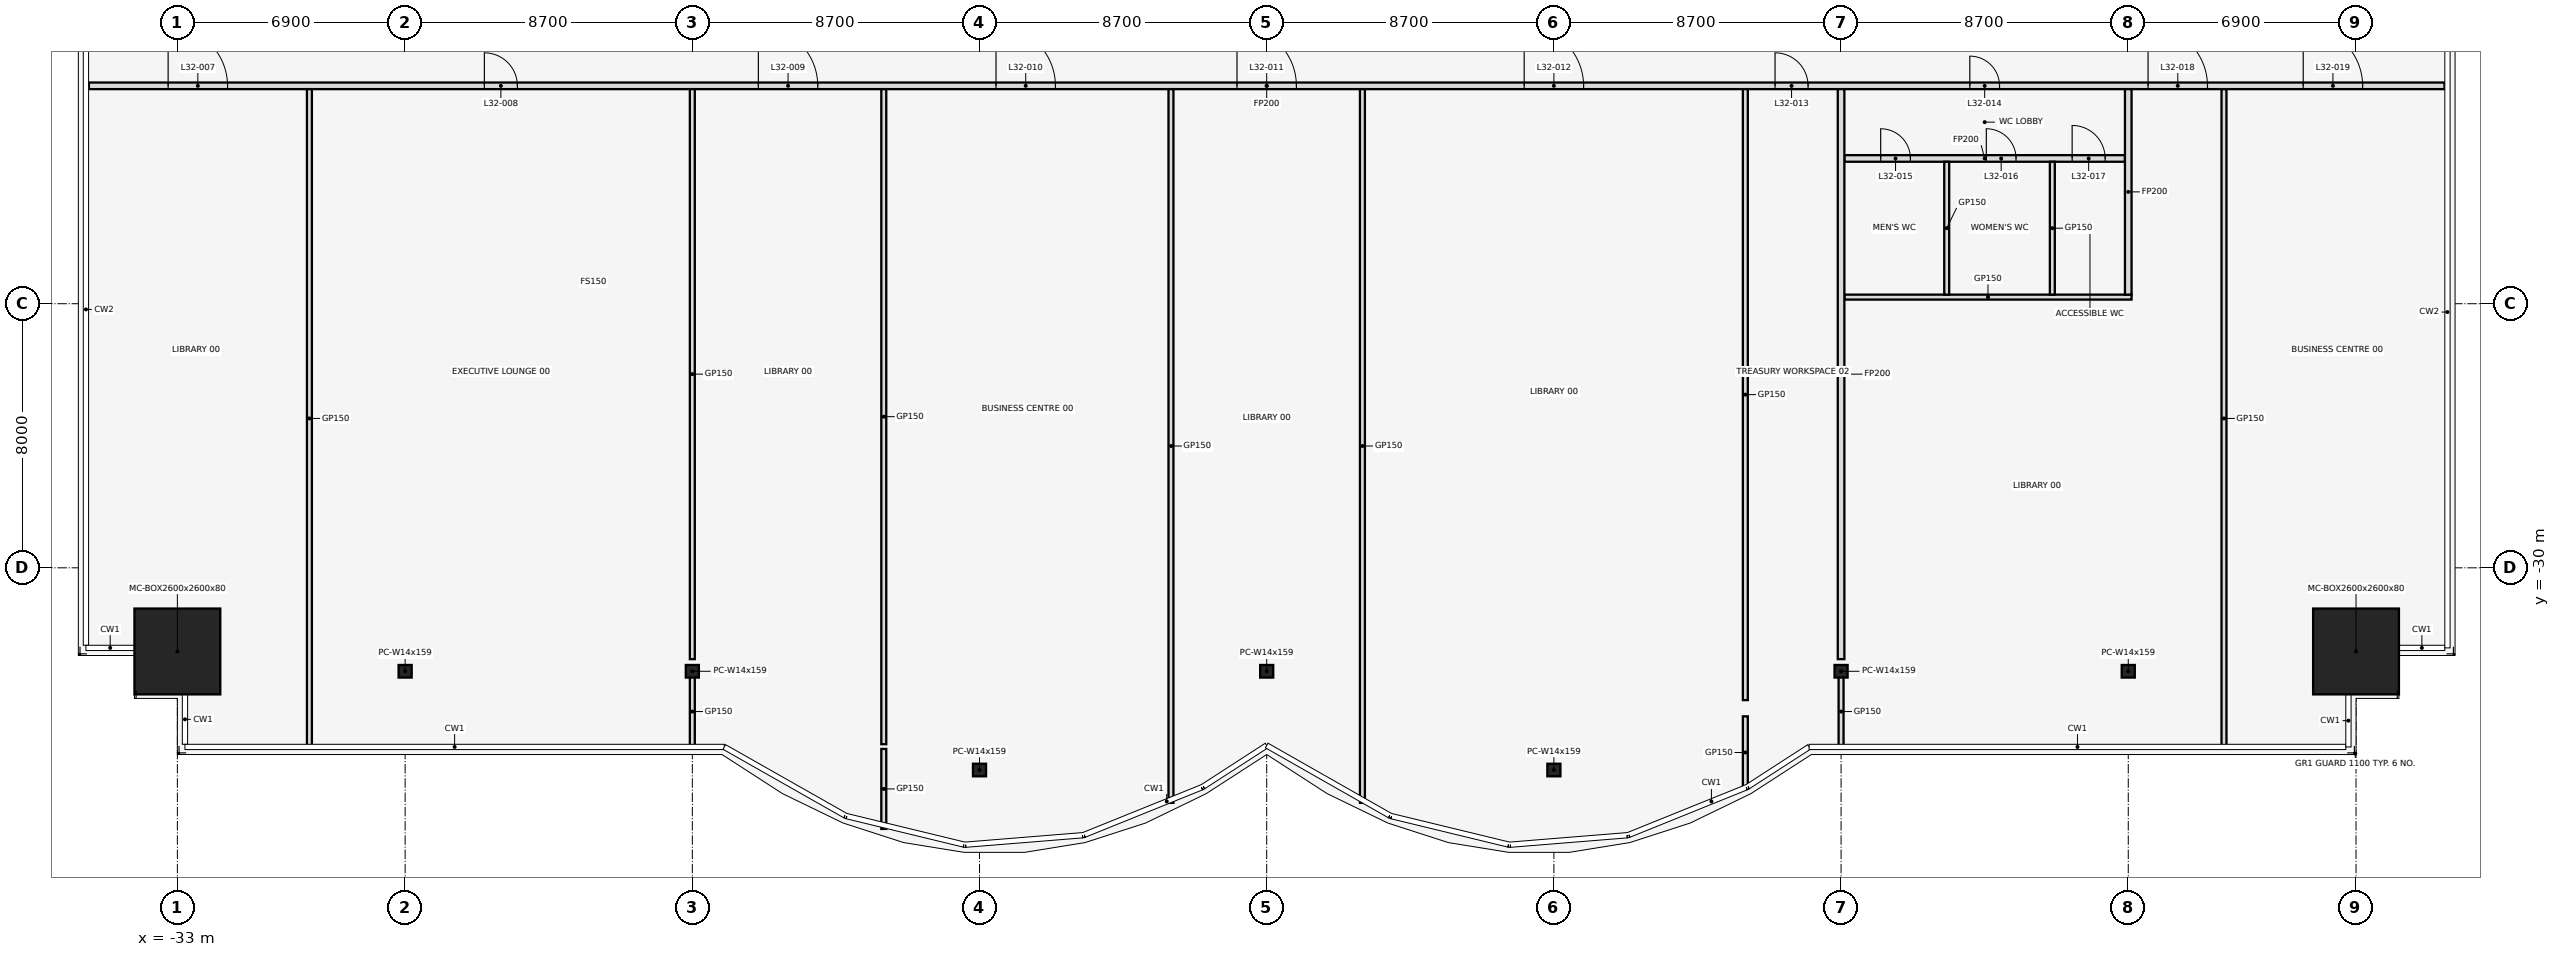
"""IFC4 building model, lengths in metres.
Left out: names, types, materials, properties, quantities, classifications, styles, units other than length and angle.
Written with IfcOpenShell. Run it as: python <this file> out.ifc"""

import sys

from ifc_helpers import new_model, si_unit, direction, frame, frame_2d, origin, origin_2d, place, context, subcontext, project, spatial, rectangle, hollow_rectangle, i_section, extrude, element, fill, save


model = new_model("IFC4")
c1 = context("Model", 3, precision=1e-05, world=origin(), true_north=direction((0.0, 1.0)))
c2 = subcontext(c1, "Body", "Model", "MODEL_VIEW")
j1 = project(units=[si_unit("LENGTHUNIT", "METRE"), si_unit("PLANEANGLEUNIT", "RADIAN")], contexts=[c1])
p1 = place(None, origin())
s1 = spatial("IfcSite", under=j1, at=p1, CompositionType="ELEMENT")
p2 = place(p1, origin())
s2 = spatial("IfcBuilding", under=s1, at=p2, CompositionType="ELEMENT")
p3 = place(p2, frame((0.0, 0.0, 148.6)))
s3 = spatial("IfcBuildingStorey", under=s2, at=p3, CompositionType="ELEMENT", Elevation=148.6)
p4 = place(p3, frame((-33.0, -32.534, 0.0), z_axis=(0.0, 0.0, 1.0), x_axis=(1.0, 0.0, 0.0)))
e1 = element("IfcColumn", 1, at=p4, inside=s3, PredefinedType="COLUMN", context=c2, shape_type="SweptSolid", body=[
    extrude(hollow_rectangle(XDim=2.6, YDim=2.6, WallThickness=0.08, at=origin_2d()), origin(), (0.0, 0.0, 1.0), 4.1),
])
for number, where, z_axis, x_axis in (
    (2, (-26.1, -33.134, 0.0), (0.0, 0.0, 1.0), (1.0, 0.0, 0.0)),
    (3, (-17.4, -33.134, 0.0), (0.0, 0.0, 1.0), (1.0, 0.0, 0.0)),
    (4, (-8.7, -36.125, 0.0), (0.0, 0.0, 1.0), (1.0, 0.0, 0.0)),
    (5, (0.0, -33.134, 0.0), (0.0, 0.0, 1.0), (1.0, 0.0, 0.0)),
    (6, (8.7, -36.125, 0.0), (0.0, 0.0, 1.0), (1.0, 0.0, 0.0)),
    (7, (17.4, -33.134, 0.0), (0.0, 0.0, 1.0), (1.0, 0.0, 0.0)),
    (8, (26.1, -33.134, 0.0), (0.0, 0.0, 1.0), (1.0, 0.0, 0.0)),
):
    element("IfcColumn", number, at=place(p3, frame(where, z_axis=z_axis, x_axis=x_axis)), inside=s3, PredefinedType="COLUMN", context=c2, shape_type="SweptSolid", body=[
        extrude(i_section(OverallWidth=0.396, OverallDepth=0.381, WebThickness=0.019, FlangeThickness=0.03, at=origin_2d()), origin(), (0.0, 0.0, 1.0), 4.1),
    ])
p5 = place(p3, frame((33.0, -32.534, 0.0), z_axis=(0.0, 0.0, 1.0), x_axis=(1.0, 0.0, 0.0)))
e9 = element("IfcColumn", 9, at=p5, inside=s3, PredefinedType="COLUMN", context=c2, shape_type="SweptSolid", body=[
    extrude(hollow_rectangle(XDim=2.6, YDim=2.6, WallThickness=0.08, at=origin_2d()), origin(), (0.0, 0.0, 1.0), 4.1),
])
p6 = place(p3, frame((17.5, -21.8, 0.0), z_axis=(0.0, 0.0, 1.0), x_axis=(1.0, 0.0, 0.0)))
e10 = element("IfcWall", 10, at=p6, inside=s3, PredefinedType="PARTITIONING", context=c2, shape_type="SweptSolid", body=[
    extrude(rectangle(XDim=8.7, YDim=0.15, at=frame_2d((4.35, 0.0))), origin(), (0.0, 0.0, 1.0), 2.84),
])
p7 = place(p3, frame((17.5, -17.6, 0.0), z_axis=(0.0, 0.0, 1.0), x_axis=(1.0, 0.0, 0.0)))
e11 = element("IfcWall", 11, at=p7, inside=s3, PredefinedType="PARTITIONING", context=c2, shape_type="SweptSolid", body=[
    extrude(rectangle(XDim=8.5, YDim=0.2, at=frame_2d((4.25, 0.0))), origin(), (0.0, 0.0, 1.0), 2.84),
])
p8 = place(p7, frame((1.1, 0.0, 0.0)))
e12 = element("IfcOpeningElement", 12, at=p8, cuts=e11, PredefinedType="OPENING", context=c2, shape_type="SweptSolid", body=[
    extrude(rectangle(XDim=0.9, YDim=2.1, at=frame_2d((0.45, 1.05))), frame((0.0, 0.112, 0.0), z_axis=(0.0, -1.0, 0.0), x_axis=(1.0, 0.0, 0.0)), (0.0, 0.0, 1.0), 0.224),
])
p9 = place(p7, frame((4.3, 0.0, 0.0)))
e13 = element("IfcOpeningElement", 13, at=p9, cuts=e11, PredefinedType="OPENING", context=c2, shape_type="SweptSolid", body=[
    extrude(rectangle(XDim=0.9, YDim=2.1, at=frame_2d((0.45, 1.05))), frame((0.0, 0.112, 0.0), z_axis=(0.0, -1.0, 0.0), x_axis=(1.0, 0.0, 0.0)), (0.0, 0.0, 1.0), 0.224),
])
p10 = place(p7, frame((6.9, 0.0, 0.0)))
e14 = element("IfcOpeningElement", 14, at=p10, cuts=e11, PredefinedType="OPENING", context=c2, shape_type="SweptSolid", body=[
    extrude(rectangle(XDim=1.0, YDim=2.1, at=frame_2d((0.5, 1.05))), frame((0.0, 0.112, 0.0), z_axis=(0.0, -1.0, 0.0), x_axis=(1.0, 0.0, 0.0)), (0.0, 0.0, 1.0), 0.224),
])
p11 = place(p3, frame((-35.68, -15.4, 0.0), z_axis=(0.0, 0.0, 1.0), x_axis=(1.0, 0.0, 0.0)))
e15 = element("IfcWall", 15, at=p11, inside=s3, PredefinedType="PARTITIONING", context=c2, shape_type="SweptSolid", body=[
    extrude(rectangle(XDim=71.36, YDim=0.2, at=frame_2d((35.68, 0.0))), origin(), (0.0, 0.0, 1.0), 2.84),
])
p12 = place(p11, frame((2.4, 0.0, 0.0)))
e16 = element("IfcOpeningElement", 16, at=p12, cuts=e15, PredefinedType="OPENING", context=c2, shape_type="SweptSolid", body=[
    extrude(rectangle(XDim=1.8, YDim=2.1, at=frame_2d((0.9, 1.05))), frame((0.0, 0.112, 0.0), z_axis=(0.0, -1.0, 0.0), x_axis=(1.0, 0.0, 0.0)), (0.0, 0.0, 1.0), 0.224),
])
p13 = place(p11, frame((11.98, 0.0, 0.0)))
e17 = element("IfcOpeningElement", 17, at=p13, cuts=e15, PredefinedType="OPENING", context=c2, shape_type="SweptSolid", body=[
    extrude(rectangle(XDim=1.0, YDim=2.1, at=frame_2d((0.5, 1.05))), frame((0.0, 0.112, 0.0), z_axis=(0.0, -1.0, 0.0), x_axis=(1.0, 0.0, 0.0)), (0.0, 0.0, 1.0), 0.224),
])
p14 = place(p11, frame((20.28, 0.0, 0.0)))
e18 = element("IfcOpeningElement", 18, at=p14, cuts=e15, PredefinedType="OPENING", context=c2, shape_type="SweptSolid", body=[
    extrude(rectangle(XDim=1.8, YDim=2.1, at=frame_2d((0.9, 1.05))), frame((0.0, 0.112, 0.0), z_axis=(0.0, -1.0, 0.0), x_axis=(1.0, 0.0, 0.0)), (0.0, 0.0, 1.0), 0.224),
])
p15 = place(p11, frame((27.48, 0.0, 0.0)))
e19 = element("IfcOpeningElement", 19, at=p15, cuts=e15, PredefinedType="OPENING", context=c2, shape_type="SweptSolid", body=[
    extrude(rectangle(XDim=1.8, YDim=2.1, at=frame_2d((0.9, 1.05))), frame((0.0, 0.112, 0.0), z_axis=(0.0, -1.0, 0.0), x_axis=(1.0, 0.0, 0.0)), (0.0, 0.0, 1.0), 0.224),
])
p16 = place(p11, frame((34.78, 0.0, 0.0)))
e20 = element("IfcOpeningElement", 20, at=p16, cuts=e15, PredefinedType="OPENING", context=c2, shape_type="SweptSolid", body=[
    extrude(rectangle(XDim=1.8, YDim=2.1, at=frame_2d((0.9, 1.05))), frame((0.0, 0.112, 0.0), z_axis=(0.0, -1.0, 0.0), x_axis=(1.0, 0.0, 0.0)), (0.0, 0.0, 1.0), 0.224),
])
p17 = place(p11, frame((43.48, 0.0, 0.0)))
e21 = element("IfcOpeningElement", 21, at=p17, cuts=e15, PredefinedType="OPENING", context=c2, shape_type="SweptSolid", body=[
    extrude(rectangle(XDim=1.8, YDim=2.1, at=frame_2d((0.9, 1.05))), frame((0.0, 0.112, 0.0), z_axis=(0.0, -1.0, 0.0), x_axis=(1.0, 0.0, 0.0)), (0.0, 0.0, 1.0), 0.224),
])
p18 = place(p11, frame((51.08, 0.0, 0.0)))
e22 = element("IfcOpeningElement", 22, at=p18, cuts=e15, PredefinedType="OPENING", context=c2, shape_type="SweptSolid", body=[
    extrude(rectangle(XDim=1.0, YDim=2.1, at=frame_2d((0.5, 1.05))), frame((0.0, 0.112, 0.0), z_axis=(0.0, -1.0, 0.0), x_axis=(1.0, 0.0, 0.0)), (0.0, 0.0, 1.0), 0.224),
])
p19 = place(p11, frame((56.98, 0.0, 0.0)))
e23 = element("IfcOpeningElement", 23, at=p19, cuts=e15, PredefinedType="OPENING", context=c2, shape_type="SweptSolid", body=[
    extrude(rectangle(XDim=0.9, YDim=2.1, at=frame_2d((0.45, 1.05))), frame((0.0, 0.112, 0.0), z_axis=(0.0, -1.0, 0.0), x_axis=(1.0, 0.0, 0.0)), (0.0, 0.0, 1.0), 0.224),
])
p20 = place(p11, frame((62.38, 0.0, 0.0)))
e24 = element("IfcOpeningElement", 24, at=p20, cuts=e15, PredefinedType="OPENING", context=c2, shape_type="SweptSolid", body=[
    extrude(rectangle(XDim=1.8, YDim=2.1, at=frame_2d((0.9, 1.05))), frame((0.0, 0.112, 0.0), z_axis=(0.0, -1.0, 0.0), x_axis=(1.0, 0.0, 0.0)), (0.0, 0.0, 1.0), 0.224),
])
p21 = place(p11, frame((67.08, 0.0, 0.0)))
e25 = element("IfcOpeningElement", 25, at=p21, cuts=e15, PredefinedType="OPENING", context=c2, shape_type="SweptSolid", body=[
    extrude(rectangle(XDim=1.8, YDim=2.1, at=frame_2d((0.9, 1.05))), frame((0.0, 0.112, 0.0), z_axis=(0.0, -1.0, 0.0), x_axis=(1.0, 0.0, 0.0)), (0.0, 0.0, 1.0), 0.224),
])
p22 = place(p3, frame((-29.0, -35.45, 0.0), z_axis=(0.0, 0.0, 1.0), x_axis=(0.0, 1.0, 0.0)))
e26 = element("IfcWall", 26, at=p22, inside=s3, PredefinedType="PARTITIONING", context=c2, shape_type="SweptSolid", body=[
    extrude(rectangle(XDim=19.95, YDim=0.15, at=frame_2d((9.975, 0.0))), origin(), (0.0, 0.0, 1.0), 2.84),
])
p23 = place(p3, frame((-17.4, -35.45, 0.0), z_axis=(0.0, 0.0, 1.0), x_axis=(0.0, 1.0, 0.0)))
e27 = element("IfcWall", 27, at=p23, inside=s3, PredefinedType="PARTITIONING", context=c2, shape_type="SweptSolid", body=[
    extrude(rectangle(XDim=2.192, YDim=0.15, at=frame_2d((1.096, 0.0))), origin(), (0.0, 0.0, 1.0), 2.84),
])
p24 = place(p3, frame((-17.4, -32.766, 0.0), z_axis=(0.0, 0.0, 1.0), x_axis=(0.0, 1.0, 0.0)))
e28 = element("IfcWall", 28, at=p24, inside=s3, PredefinedType="PARTITIONING", context=c2, shape_type="SweptSolid", body=[
    extrude(rectangle(XDim=17.266, YDim=0.15, at=frame_2d((8.633, 0.0))), origin(), (0.0, 0.0, 1.0), 2.84),
])
p25 = place(p3, frame((-11.6, -37.91, 0.0), z_axis=(0.0, 0.0, 1.0), x_axis=(0.0, 1.0, 0.0)))
e29 = element("IfcWall", 29, at=p25, inside=s3, PredefinedType="PARTITIONING", context=c2, shape_type="SweptSolid", body=[
    extrude(rectangle(XDim=2.424, YDim=0.15, at=frame_2d((1.212, 0.0))), origin(), (0.0, 0.0, 1.0), 2.84),
])
p26 = place(p3, frame((-11.6, -35.343, 0.0), z_axis=(0.0, 0.0, 1.0), x_axis=(0.0, 1.0, 0.0)))
e30 = element("IfcWall", 30, at=p26, inside=s3, PredefinedType="PARTITIONING", context=c2, shape_type="SweptSolid", body=[
    extrude(rectangle(XDim=19.843, YDim=0.15, at=frame_2d((9.921, 0.0))), origin(), (0.0, 0.0, 1.0), 2.84),
])
for number, where, z_axis, x_axis in (
    (31, (-2.9, -37.12, 0.0), (0.0, 0.0, 1.0), (0.0, 1.0, 0.0)),
    (32, (2.9, -37.12, 0.0), (0.0, 0.0, 1.0), (0.0, 1.0, 0.0)),
):
    element("IfcWall", number, at=place(p3, frame(where, z_axis=z_axis, x_axis=x_axis)), inside=s3, PredefinedType="PARTITIONING", context=c2, shape_type="SweptSolid", body=[
        extrude(rectangle(XDim=21.62, YDim=0.15, at=frame_2d((10.81, 0.0))), origin(), (0.0, 0.0, 1.0), 2.84),
    ])
p27 = place(p3, frame((14.5, -36.69, 0.0), z_axis=(0.0, 0.0, 1.0), x_axis=(0.0, 1.0, 0.0)))
e33 = element("IfcWall", 33, at=p27, inside=s3, PredefinedType="PARTITIONING", context=c2, shape_type="SweptSolid", body=[
    extrude(rectangle(XDim=2.191, YDim=0.15, at=frame_2d((1.096, 0.0))), origin(), (0.0, 0.0, 1.0), 2.84),
])
p28 = place(p3, frame((14.5, -34.007, 0.0), z_axis=(0.0, 0.0, 1.0), x_axis=(0.0, 1.0, 0.0)))
e34 = element("IfcWall", 34, at=p28, inside=s3, PredefinedType="PARTITIONING", context=c2, shape_type="SweptSolid", body=[
    extrude(rectangle(XDim=18.507, YDim=0.15, at=frame_2d((9.253, 0.0))), origin(), (0.0, 0.0, 1.0), 2.84),
])
p29 = place(p3, frame((17.4, -35.45, 0.0), z_axis=(0.0, 0.0, 1.0), x_axis=(0.0, 1.0, 0.0)))
e35 = element("IfcWall", 35, at=p29, inside=s3, PredefinedType="PARTITIONING", context=c2, shape_type="SweptSolid", body=[
    extrude(rectangle(XDim=2.192, YDim=0.15, at=frame_2d((1.096, 0.0))), origin(), (0.0, 0.0, 1.0), 2.84),
])
p30 = place(p3, frame((17.4, -32.766, 0.0), z_axis=(0.0, 0.0, 1.0), x_axis=(0.0, 1.0, 0.0)))
e36 = element("IfcWall", 36, at=p30, inside=s3, PredefinedType="PARTITIONING", context=c2, shape_type="SweptSolid", body=[
    extrude(rectangle(XDim=17.266, YDim=0.2, at=frame_2d((8.633, 0.0))), origin(), (0.0, 0.0, 1.0), 2.84),
])
for number, where, z_axis, x_axis in (
    (37, (20.6, -21.725, 0.0), (0.0, 0.0, 1.0), (0.0, 1.0, 0.0)),
    (38, (23.8, -21.725, 0.0), (0.0, 0.0, 1.0), (0.0, 1.0, 0.0)),
):
    element("IfcWall", number, at=place(p3, frame(where, z_axis=z_axis, x_axis=x_axis)), inside=s3, PredefinedType="PARTITIONING", context=c2, shape_type="SweptSolid", body=[
        extrude(rectangle(XDim=4.025, YDim=0.15, at=frame_2d((2.013, 0.0))), origin(), (0.0, 0.0, 1.0), 2.84),
    ])
p31 = place(p3, frame((26.1, -21.725, 0.0), z_axis=(0.0, 0.0, 1.0), x_axis=(0.0, 1.0, 0.0)))
e39 = element("IfcWall", 39, at=p31, inside=s3, PredefinedType="PARTITIONING", context=c2, shape_type="SweptSolid", body=[
    extrude(rectangle(XDim=6.225, YDim=0.2, at=frame_2d((3.113, 0.0))), origin(), (0.0, 0.0, 1.0), 2.84),
])
p32 = place(p3, frame((29.0, -35.45, 0.0), z_axis=(0.0, 0.0, 1.0), x_axis=(0.0, 1.0, 0.0)))
e40 = element("IfcWall", 40, at=p32, inside=s3, PredefinedType="PARTITIONING", context=c2, shape_type="SweptSolid", body=[
    extrude(rectangle(XDim=19.95, YDim=0.15, at=frame_2d((9.975, 0.0))), origin(), (0.0, 0.0, 1.0), 2.84),
])
p33 = place(p12, origin())
e41 = element("IfcDoor", 41, at=p33, inside=s3, OperationType="SINGLE_SWING_LEFT", PredefinedType="DOOR", context=c2, shape_type="SweptSolid", body=[
    extrude(rectangle(XDim=1.8, YDim=2.1, at=frame_2d((0.9, 1.05))), frame((0.0, 0.025, 0.0), z_axis=(0.0, -1.0, 0.0), x_axis=(1.0, 0.0, 0.0)), (0.0, 0.0, 1.0), 0.05),
])
fill(e16, e41)
p34 = place(p13, frame((1.0, 0.0, 0.0), z_axis=(0.0, 0.0, 1.0), x_axis=(-1.0, 0.0, 0.0)))
e42 = element("IfcDoor", 42, at=p34, inside=s3, OperationType="SINGLE_SWING_RIGHT", PredefinedType="DOOR", context=c2, shape_type="SweptSolid", body=[
    extrude(rectangle(XDim=1.0, YDim=2.1, at=frame_2d((0.5, 1.05))), frame((0.0, 0.025, 0.0), z_axis=(0.0, -1.0, 0.0), x_axis=(1.0, 0.0, 0.0)), (0.0, 0.0, 1.0), 0.05),
])
fill(e17, e42)
p35 = place(p14, origin())
e43 = element("IfcDoor", 43, at=p35, inside=s3, OperationType="SINGLE_SWING_LEFT", PredefinedType="DOOR", context=c2, shape_type="SweptSolid", body=[
    extrude(rectangle(XDim=1.8, YDim=2.1, at=frame_2d((0.9, 1.05))), frame((0.0, 0.025, 0.0), z_axis=(0.0, -1.0, 0.0), x_axis=(1.0, 0.0, 0.0)), (0.0, 0.0, 1.0), 0.05),
])
fill(e18, e43)
p36 = place(p15, origin())
e44 = element("IfcDoor", 44, at=p36, inside=s3, OperationType="SINGLE_SWING_LEFT", PredefinedType="DOOR", context=c2, shape_type="SweptSolid", body=[
    extrude(rectangle(XDim=1.8, YDim=2.1, at=frame_2d((0.9, 1.05))), frame((0.0, 0.025, 0.0), z_axis=(0.0, -1.0, 0.0), x_axis=(1.0, 0.0, 0.0)), (0.0, 0.0, 1.0), 0.05),
])
fill(e19, e44)
p37 = place(p16, origin())
e45 = element("IfcDoor", 45, at=p37, inside=s3, OperationType="SINGLE_SWING_LEFT", PredefinedType="DOOR", context=c2, shape_type="SweptSolid", body=[
    extrude(rectangle(XDim=1.8, YDim=2.1, at=frame_2d((0.9, 1.05))), frame((0.0, 0.025, 0.0), z_axis=(0.0, -1.0, 0.0), x_axis=(1.0, 0.0, 0.0)), (0.0, 0.0, 1.0), 0.05),
])
fill(e20, e45)
p38 = place(p17, origin())
e46 = element("IfcDoor", 46, at=p38, inside=s3, OperationType="SINGLE_SWING_LEFT", PredefinedType="DOOR", context=c2, shape_type="SweptSolid", body=[
    extrude(rectangle(XDim=1.8, YDim=2.1, at=frame_2d((0.9, 1.05))), frame((0.0, 0.025, 0.0), z_axis=(0.0, -1.0, 0.0), x_axis=(1.0, 0.0, 0.0)), (0.0, 0.0, 1.0), 0.05),
])
fill(e21, e46)
p39 = place(p18, frame((1.0, 0.0, 0.0), z_axis=(0.0, 0.0, 1.0), x_axis=(-1.0, 0.0, 0.0)))
e47 = element("IfcDoor", 47, at=p39, inside=s3, OperationType="SINGLE_SWING_LEFT", PredefinedType="DOOR", context=c2, shape_type="SweptSolid", body=[
    extrude(rectangle(XDim=1.0, YDim=2.1, at=frame_2d((0.5, 1.05))), frame((0.0, 0.025, 0.0), z_axis=(0.0, -1.0, 0.0), x_axis=(1.0, 0.0, 0.0)), (0.0, 0.0, 1.0), 0.05),
])
fill(e22, e47)
p40 = place(p19, frame((0.9, 0.0, 0.0), z_axis=(0.0, 0.0, 1.0), x_axis=(-1.0, 0.0, 0.0)))
e48 = element("IfcDoor", 48, at=p40, inside=s3, OperationType="SINGLE_SWING_RIGHT", PredefinedType="DOOR", context=c2, shape_type="SweptSolid", body=[
    extrude(rectangle(XDim=0.9, YDim=2.1, at=frame_2d((0.45, 1.05))), frame((0.0, 0.025, 0.0), z_axis=(0.0, -1.0, 0.0), x_axis=(1.0, 0.0, 0.0)), (0.0, 0.0, 1.0), 0.05),
])
fill(e23, e48)
p41 = place(p8, frame((0.9, 0.0, 0.0), z_axis=(0.0, 0.0, 1.0), x_axis=(-1.0, 0.0, 0.0)))
e49 = element("IfcDoor", 49, at=p41, inside=s3, OperationType="SINGLE_SWING_RIGHT", PredefinedType="DOOR", context=c2, shape_type="SweptSolid", body=[
    extrude(rectangle(XDim=0.9, YDim=2.1, at=frame_2d((0.45, 1.05))), frame((0.0, 0.025, 0.0), z_axis=(0.0, -1.0, 0.0), x_axis=(1.0, 0.0, 0.0)), (0.0, 0.0, 1.0), 0.05),
])
fill(e12, e49)
p42 = place(p9, frame((0.9, 0.0, 0.0), z_axis=(0.0, 0.0, 1.0), x_axis=(-1.0, 0.0, 0.0)))
e50 = element("IfcDoor", 50, at=p42, inside=s3, OperationType="SINGLE_SWING_LEFT", PredefinedType="DOOR", context=c2, shape_type="SweptSolid", body=[
    extrude(rectangle(XDim=0.9, YDim=2.1, at=frame_2d((0.45, 1.05))), frame((0.0, 0.025, 0.0), z_axis=(0.0, -1.0, 0.0), x_axis=(1.0, 0.0, 0.0)), (0.0, 0.0, 1.0), 0.05),
])
fill(e13, e50)
p43 = place(p10, frame((1.0, 0.0, 0.0), z_axis=(0.0, 0.0, 1.0), x_axis=(-1.0, 0.0, 0.0)))
e51 = element("IfcDoor", 51, at=p43, inside=s3, OperationType="SINGLE_SWING_RIGHT", PredefinedType="DOOR", context=c2, shape_type="SweptSolid", body=[
    extrude(rectangle(XDim=1.0, YDim=2.1, at=frame_2d((0.5, 1.05))), frame((0.0, 0.025, 0.0), z_axis=(0.0, -1.0, 0.0), x_axis=(1.0, 0.0, 0.0)), (0.0, 0.0, 1.0), 0.05),
])
fill(e14, e51)
p44 = place(p20, origin())
e52 = element("IfcDoor", 52, at=p44, inside=s3, OperationType="SINGLE_SWING_LEFT", PredefinedType="DOOR", context=c2, shape_type="SweptSolid", body=[
    extrude(rectangle(XDim=1.8, YDim=2.1, at=frame_2d((0.9, 1.05))), frame((0.0, 0.025, 0.0), z_axis=(0.0, -1.0, 0.0), x_axis=(1.0, 0.0, 0.0)), (0.0, 0.0, 1.0), 0.05),
])
fill(e24, e52)
p45 = place(p21, origin())
e53 = element("IfcDoor", 53, at=p45, inside=s3, OperationType="SINGLE_SWING_LEFT", PredefinedType="DOOR", context=c2, shape_type="SweptSolid", body=[
    extrude(rectangle(XDim=1.8, YDim=2.1, at=frame_2d((0.9, 1.05))), frame((0.0, 0.025, 0.0), z_axis=(0.0, -1.0, 0.0), x_axis=(1.0, 0.0, 0.0)), (0.0, 0.0, 1.0), 0.05),
])
fill(e25, e53)
save(model, sys.argv[1])
